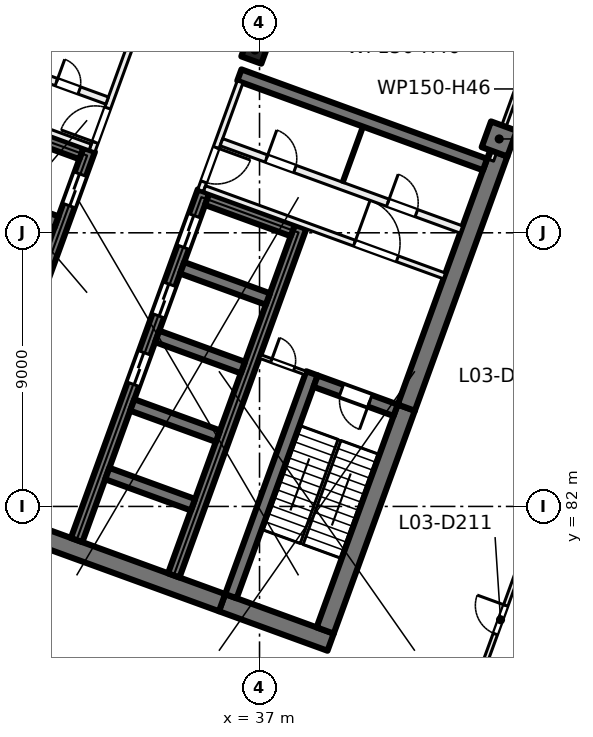
"""IFC4 building model, lengths in metres.
Left out: names, types, materials, properties, quantities, classifications, styles, units other than length and angle.
Written with IfcOpenShell. Run it as: python <this file> out.ifc"""

import sys

from ifc_helpers import new_model, si_unit, direction, frame, frame_2d, origin, origin_2d, place, context, subcontext, project, spatial, rectangle, extrude, element, fill, save


model = new_model("IFC4")
c1 = context("Model", 3, precision=1e-05, world=origin(), true_north=direction((0.0, 1.0)))
c2 = subcontext(c1, "Body", "Model", "MODEL_VIEW")
j1 = project(units=[si_unit("LENGTHUNIT", "METRE"), si_unit("PLANEANGLEUNIT", "RADIAN")], contexts=[c1])
p1 = place(None, origin())
s1 = spatial("IfcSite", under=j1, at=p1, CompositionType="ELEMENT")
p2 = place(p1, origin())
s2 = spatial("IfcBuilding", under=s1, at=p2, CompositionType="ELEMENT")
p3 = place(p2, frame((0.0, 0.0, 17.5)))
s3 = spatial("IfcBuildingStorey", under=s2, at=p3, CompositionType="ELEMENT", Elevation=17.5)
p4 = place(p3, frame((36.849, 97.011, 0.0), z_axis=(0.0, 0.0, 1.0), x_axis=(-0.342020143326, -0.939692620786, 0.0)))
e1 = element("IfcColumn", 1, at=p4, inside=s3, PredefinedType="COLUMN", context=c2, shape_type="SweptSolid", body=[
    extrude(rectangle(XDim=0.7, YDim=0.7, at=origin_2d()), origin(), (0.0, 0.0, 1.0), 5.0),
])
p5 = place(p3, frame((44.884, 94.087, 0.0), z_axis=(0.0, 0.0, 1.0), x_axis=(-0.342020143326, -0.939692620786, 0.0)))
e2 = element("IfcColumn", 2, at=p5, inside=s3, PredefinedType="COLUMN", context=c2, shape_type="SweptSolid", body=[
    extrude(rectangle(XDim=0.9, YDim=0.9, at=origin_2d()), origin(), (0.0, 0.0, 1.0), 5.0),
])
p6 = place(p3, frame((39.338, 77.535, 0.0), z_axis=(0.0, 0.0, 1.0), x_axis=(-0.939701471648, 0.341995824804, 0.0)))
e3 = element("IfcWall", 3, at=p6, inside=s3, PredefinedType="SHEAR", context=c2, shape_type="SweptSolid", body=[
    extrude(rectangle(XDim=3.8, YDim=0.6, at=frame_2d((1.9, 0.0))), origin(), (0.0, 0.0, 1.0), 5.0),
])
p7 = place(p3, frame((35.767, 78.835, 0.0), z_axis=(0.0, 0.0, 1.0), x_axis=(-0.939692894512, 0.342019391267, 0.0)))
e4 = element("IfcWall", 4, at=p7, inside=s3, PredefinedType="SHEAR", context=c2, shape_type="SweptSolid", body=[
    extrude(rectangle(XDim=14.4, YDim=0.6, at=frame_2d((7.2, 0.0))), origin(), (0.0, 0.0, 1.0), 5.0),
])
p8 = place(p3, frame((39.159, 77.92, 0.0), z_axis=(0.0, 0.0, 1.0), x_axis=(0.342016982193, 0.939693771338, 0.0)))
e5 = element("IfcWall", 5, at=p8, inside=s3, PredefinedType="SHEAR", context=c2, shape_type="SweptSolid", body=[
    extrude(rectangle(XDim=7.8, YDim=0.6, at=frame_2d((3.9, 0.0))), origin(), (0.0, 0.0, 1.0), 5.0),
])
p9 = place(p3, frame((41.827, 85.249, 0.0), z_axis=(0.0, 0.0, 1.0), x_axis=(0.342016162452, 0.939694069696, 0.0)))
e6 = element("IfcWall", 6, at=p9, inside=s3, PredefinedType="SHEAR", context=c2, shape_type="SweptSolid", body=[
    extrude(rectangle(XDim=8.9, YDim=0.6, at=frame_2d((4.45, 0.0))), origin(), (0.0, 0.0, 1.0), 5.0),
])
p10 = place(p3, frame((36.058, 79.048, 0.0), z_axis=(0.0, 0.0, 1.0), x_axis=(0.342016982193, 0.939693771338, 0.0)))
e7 = element("IfcWall", 7, at=p10, inside=s3, PredefinedType="SHEAR", context=c2, shape_type="SweptSolid", body=[
    extrude(rectangle(XDim=7.8, YDim=0.4, at=frame_2d((3.9, 0.0))), origin(), (0.0, 0.0, 1.0), 5.0),
])
p11 = place(p3, frame((41.476, 85.164, 0.0), z_axis=(0.0, 0.0, 1.0), x_axis=(-0.939678810556, 0.342058084236, 0.0)))
e8 = element("IfcWall", 8, at=p11, inside=s3, PredefinedType="SHEAR", context=c2, shape_type="SweptSolid", body=[
    extrude(rectangle(XDim=2.8, YDim=0.4, at=frame_2d((1.4, 0.0))), origin(), (0.0, 0.0, 1.0), 5.0),
])
p12 = place(p11, frame((0.9, 0.0, 0.0)))
e9 = element("IfcOpeningElement", 9, at=p12, cuts=e8, PredefinedType="OPENING", context=c2, shape_type="SweptSolid", body=[
    extrude(rectangle(XDim=1.0, YDim=2.1, at=frame_2d((0.5, 1.05))), frame((0.0, 0.21, 0.0), z_axis=(0.0, -1.0, 0.0), x_axis=(1.0, 0.0, 0.0)), (0.0, 0.0, 1.0), 0.42),
])
p13 = place(p3, frame((30.984, 80.895, 0.0), z_axis=(0.0, 0.0, 1.0), x_axis=(0.342021021735, 0.939692301071, 0.0)))
e10 = element("IfcWall", 10, at=p13, inside=s3, PredefinedType="SHEAR", context=c2, shape_type="SweptSolid", body=[
    extrude(rectangle(XDim=12.2, YDim=0.4, at=frame_2d((6.1, 0.0))), origin(), (0.0, 0.0, 1.0), 5.0),
])
p14 = place(p13, frame((5.45, 0.0, 0.0)))
e11 = element("IfcOpeningElement", 11, at=p14, cuts=e10, PredefinedType="OPENING", context=c2, shape_type="SweptSolid", body=[
    extrude(rectangle(XDim=1.1, YDim=2.1, at=frame_2d((0.55, 1.05))), frame((0.0, 0.21, 0.0), z_axis=(0.0, -1.0, 0.0), x_axis=(1.0, 0.0, 0.0)), (0.0, 0.0, 1.0), 0.42),
])
p15 = place(p13, frame((7.85, 0.0, 0.0)))
e12 = element("IfcOpeningElement", 12, at=p15, cuts=e10, PredefinedType="OPENING", context=c2, shape_type="SweptSolid", body=[
    extrude(rectangle(XDim=1.1, YDim=2.1, at=frame_2d((0.55, 1.05))), frame((0.0, 0.21, 0.0), z_axis=(0.0, -1.0, 0.0), x_axis=(1.0, 0.0, 0.0)), (0.0, 0.0, 1.0), 0.42),
])
p16 = place(p13, frame((10.25, 0.0, 0.0)))
e13 = element("IfcOpeningElement", 13, at=p16, cuts=e10, PredefinedType="OPENING", context=c2, shape_type="SweptSolid", body=[
    extrude(rectangle(XDim=1.1, YDim=2.1, at=frame_2d((0.55, 1.05))), frame((0.0, 0.21, 0.0), z_axis=(0.0, -1.0, 0.0), x_axis=(1.0, 0.0, 0.0)), (0.0, 0.0, 1.0), 0.42),
])
p17 = place(p3, frame((34.178, 79.732, 0.0), z_axis=(0.0, 0.0, 1.0), x_axis=(0.342014590177, 0.939694641948, 0.0)))
e14 = element("IfcWall", 14, at=p17, inside=s3, PredefinedType="SHEAR", context=c2, shape_type="SweptSolid", body=[
    extrude(rectangle(XDim=12.2, YDim=0.4, at=frame_2d((6.1, 0.0))), origin(), (0.0, 0.0, 1.0), 5.0),
])
for number, where, z_axis, x_axis in (
    (15, (34.812, 82.056, 0.0), (0.0, 0.0, 1.0), (-0.94, 0.342, 0.0)),
    (16, (35.632, 84.311, 0.0), (0.0, 0.0, 1.0), (-0.94, 0.342, 0.0)),
    (17, (36.453, 86.566, 0.0), (0.0, 0.0, 1.0), (-0.94, 0.342, 0.0)),
    (18, (37.274, 88.822, 0.0), (0.0, 0.0, 1.0), (-0.94, 0.342, 0.0)),
):
    element("IfcWall", number, at=place(p3, frame(where, z_axis=z_axis, x_axis=x_axis)), inside=s3, PredefinedType="SHEAR", context=c2, shape_type="SweptSolid", body=[
        extrude(rectangle(XDim=3.0, YDim=0.4, at=frame_2d((1.5, 0.0))), origin(), (0.0, 0.0, 1.0), 5.0),
    ])
p18 = place(p3, frame((38.095, 91.077, 0.0), z_axis=(0.0, 0.0, 1.0), x_axis=(-0.939676934218, 0.342063238742, 0.0)))
e19 = element("IfcWall", 19, at=p18, inside=s3, PredefinedType="SHEAR", context=c2, shape_type="SweptSolid", body=[
    extrude(rectangle(XDim=3.0, YDim=0.4, at=frame_2d((1.5, 0.0))), origin(), (0.0, 0.0, 1.0), 5.0),
])
p19 = place(p3, frame((27.225, 82.263, 0.0), z_axis=(0.0, 0.0, 1.0), x_axis=(0.342014590177, 0.939694641948, 0.0)))
e20 = element("IfcWall", 20, at=p19, inside=s3, PredefinedType="SHEAR", context=c2, shape_type="SweptSolid", body=[
    extrude(rectangle(XDim=12.2, YDim=0.4, at=frame_2d((6.1, 0.0))), origin(), (0.0, 0.0, 1.0), 5.0),
])
p20 = place(p19, frame((10.25, 0.0, 0.0)))
e21 = element("IfcOpeningElement", 21, at=p20, cuts=e20, PredefinedType="OPENING", context=c2, shape_type="SweptSolid", body=[
    extrude(rectangle(XDim=1.1, YDim=2.1, at=frame_2d((0.55, 1.05))), frame((0.0, 0.21, 0.0), z_axis=(0.0, -1.0, 0.0), x_axis=(1.0, 0.0, 0.0)), (0.0, 0.0, 1.0), 0.42),
])
p21 = place(p19, frame((0.7, 0.0, 0.0)))
e22 = element("IfcOpeningElement", 22, at=p21, cuts=e20, PredefinedType="OPENING", context=c2, shape_type="SweptSolid", body=[
    extrude(rectangle(XDim=0.8, YDim=2.1, at=frame_2d((0.4, 1.05))), frame((0.0, 0.21, 0.0), z_axis=(0.0, -1.0, 0.0), x_axis=(1.0, 0.0, 0.0)), (0.0, 0.0, 1.0), 0.42),
])
for number, where, z_axis, x_axis in (
    (23, (30.32, 91.353, 0.0), (0.0, 0.0, 1.0), (-0.94, 0.342, 0.0)),
    (24, (31.141, 93.608, 0.0), (0.0, 0.0, 1.0), (-0.94, 0.342, 0.0)),
):
    element("IfcWall", number, at=place(p3, frame(where, z_axis=z_axis, x_axis=x_axis)), inside=s3, PredefinedType="SHEAR", context=c2, shape_type="SweptSolid", body=[
        extrude(rectangle(XDim=3.0, YDim=0.4, at=frame_2d((1.5, 0.0))), origin(), (0.0, 0.0, 1.0), 5.0),
    ])
p22 = place(p3, frame((44.418, 93.245, 0.0), z_axis=(0.0, 0.0, 1.0), x_axis=(-0.93969060187, 0.342025690201, 0.0)))
e25 = element("IfcWall", 25, at=p22, inside=s3, PredefinedType="SHEAR", context=c2, shape_type="SweptSolid", body=[
    extrude(rectangle(XDim=8.6, YDim=0.4, at=frame_2d((4.3, 0.0))), origin(), (0.0, 0.0, 1.0), 5.0),
])
p23 = place(p3, frame((31.491, 93.693, 0.0), z_axis=(0.0, 0.0, 1.0), x_axis=(0.341995824804, 0.939701471648, 0.0)))
e26 = element("IfcWall", 26, at=p23, inside=s3, PredefinedType="PARTITIONING", context=c2, shape_type="SweptSolid", body=[
    extrude(rectangle(XDim=3.8, YDim=0.2, at=frame_2d((1.9, 0.0))), origin(), (0.0, 0.0, 1.0), 4.6),
])
p24 = place(p23, frame((0.3, 0.0, 0.0)))
e27 = element("IfcOpeningElement", 27, at=p24, cuts=e26, PredefinedType="OPENING", context=c2, shape_type="SweptSolid", body=[
    extrude(rectangle(XDim=1.2, YDim=2.1, at=frame_2d((0.6, 1.05))), frame((0.0, 0.11, 0.0), z_axis=(0.0, -1.0, 0.0), x_axis=(1.0, 0.0, 0.0)), (0.0, 0.0, 1.0), 0.22),
])
p25 = place(p3, frame((23.538, 96.694, 0.0), z_axis=(0.0, 0.0, 1.0), x_axis=(0.939691552312, -0.342023078919, 0.0)))
e28 = element("IfcWall", 28, at=p25, inside=s3, PredefinedType="PARTITIONING", context=c2, shape_type="SweptSolid", body=[
    extrude(rectangle(XDim=8.4, YDim=0.2, at=frame_2d((4.2, 0.0))), origin(), (0.0, 0.0, 1.0), 4.6),
])
p26 = place(p25, frame((1.65, 0.0, 0.0)))
e29 = element("IfcOpeningElement", 29, at=p26, cuts=e28, PredefinedType="OPENING", context=c2, shape_type="SweptSolid", body=[
    extrude(rectangle(XDim=1.5, YDim=2.1, at=frame_2d((0.75, 1.05))), frame((0.0, 0.11, 0.0), z_axis=(0.0, -1.0, 0.0), x_axis=(1.0, 0.0, 0.0)), (0.0, 0.0, 1.0), 0.22),
])
p27 = place(p3, frame((24.094, 98.221, 0.0), z_axis=(0.0, 0.0, 1.0), x_axis=(0.939691552312, -0.342023078919, 0.0)))
e30 = element("IfcWall", 30, at=p27, inside=s3, PredefinedType="PARTITIONING", context=c2, shape_type="SweptSolid", body=[
    extrude(rectangle(XDim=8.4, YDim=0.25, at=frame_2d((4.2, 0.0))), origin(), (0.0, 0.0, 1.0), 4.6),
])
p28 = place(p27, frame((6.625, 0.0, 0.0)))
e31 = element("IfcOpeningElement", 31, at=p28, cuts=e30, PredefinedType="OPENING", context=c2, shape_type="SweptSolid", body=[
    extrude(rectangle(XDim=0.8, YDim=2.1, at=frame_2d((0.4, 1.05))), frame((0.0, 0.135, 0.0), z_axis=(0.0, -1.0, 0.0), x_axis=(1.0, 0.0, 0.0)), (0.0, 0.0, 1.0), 0.27),
])
p29 = place(p27, frame((2.375, 0.0, 0.0)))
e32 = element("IfcOpeningElement", 32, at=p29, cuts=e30, PredefinedType="OPENING", context=c2, shape_type="SweptSolid", body=[
    extrude(rectangle(XDim=0.8, YDim=2.1, at=frame_2d((0.4, 1.05))), frame((0.0, 0.135, 0.0), z_axis=(0.0, -1.0, 0.0), x_axis=(1.0, 0.0, 0.0)), (0.0, 0.0, 1.0), 0.27),
])
p30 = place(p3, frame((36.362, 95.964, 0.0), z_axis=(0.0, 0.0, 1.0), x_axis=(-0.341995824804, -0.939701471648, 0.0)))
e33 = element("IfcWall", 33, at=p30, inside=s3, PredefinedType="PARTITIONING", context=c2, shape_type="SweptSolid", body=[
    extrude(rectangle(XDim=3.8, YDim=0.2, at=frame_2d((1.9, 0.0))), origin(), (0.0, 0.0, 1.0), 4.6),
])
p31 = place(p30, frame((2.3, 0.0, 0.0)))
e34 = element("IfcOpeningElement", 34, at=p31, cuts=e33, PredefinedType="OPENING", context=c2, shape_type="SweptSolid", body=[
    extrude(rectangle(XDim=1.2, YDim=2.1, at=frame_2d((0.6, 1.05))), frame((0.0, 0.11, 0.0), z_axis=(0.0, -1.0, 0.0), x_axis=(1.0, 0.0, 0.0)), (0.0, 0.0, 1.0), 0.22),
])
p32 = place(p3, frame((35.19, 92.453, 0.0), z_axis=(0.0, 0.0, 1.0), x_axis=(0.939691552312, -0.342023078919, 0.0)))
e35 = element("IfcWall", 35, at=p32, inside=s3, PredefinedType="PARTITIONING", context=c2, shape_type="SweptSolid", body=[
    extrude(rectangle(XDim=8.4, YDim=0.2, at=frame_2d((4.2, 0.0))), origin(), (0.0, 0.0, 1.0), 4.6),
])
p33 = place(p32, frame((5.25, 0.0, 0.0)))
e36 = element("IfcOpeningElement", 36, at=p33, cuts=e35, PredefinedType="OPENING", context=c2, shape_type="SweptSolid", body=[
    extrude(rectangle(XDim=1.5, YDim=2.1, at=frame_2d((0.75, 1.05))), frame((0.0, 0.11, 0.0), z_axis=(0.0, -1.0, 0.0), x_axis=(1.0, 0.0, 0.0)), (0.0, 0.0, 1.0), 0.22),
])
p34 = place(p3, frame((35.746, 93.98, 0.0), z_axis=(0.0, 0.0, 1.0), x_axis=(0.939691552312, -0.342023078919, 0.0)))
e37 = element("IfcWall", 37, at=p34, inside=s3, PredefinedType="PARTITIONING", context=c2, shape_type="SweptSolid", body=[
    extrude(rectangle(XDim=8.4, YDim=0.25, at=frame_2d((4.2, 0.0))), origin(), (0.0, 0.0, 1.0), 4.6),
])
p35 = place(p34, frame((1.575, 0.0, 0.0)))
e38 = element("IfcOpeningElement", 38, at=p35, cuts=e37, PredefinedType="OPENING", context=c2, shape_type="SweptSolid", body=[
    extrude(rectangle(XDim=1.0, YDim=2.1, at=frame_2d((0.5, 1.05))), frame((0.0, 0.135, 0.0), z_axis=(0.0, -1.0, 0.0), x_axis=(1.0, 0.0, 0.0)), (0.0, 0.0, 1.0), 0.27),
])
p36 = place(p34, frame((5.825, 0.0, 0.0)))
e39 = element("IfcOpeningElement", 39, at=p36, cuts=e37, PredefinedType="OPENING", context=c2, shape_type="SweptSolid", body=[
    extrude(rectangle(XDim=1.0, YDim=2.1, at=frame_2d((0.5, 1.05))), frame((0.0, 0.135, 0.0), z_axis=(0.0, -1.0, 0.0), x_axis=(1.0, 0.0, 0.0)), (0.0, 0.0, 1.0), 0.27),
])
p37 = place(p3, frame((37.013, 86.935, 0.0), z_axis=(0.0, 0.0, 1.0), x_axis=(0.939659694648, -0.342110593602, 0.0)))
e40 = element("IfcWall", 40, at=p37, inside=s3, PredefinedType="PARTITIONING", context=c2, shape_type="SweptSolid", body=[
    extrude(rectangle(XDim=1.6, YDim=0.125, at=frame_2d((0.8, 0.0))), origin(), (0.0, 0.0, 1.0), 4.6),
])
p38 = place(p37, frame((0.4, 0.0, 0.0)))
e41 = element("IfcOpeningElement", 41, at=p38, cuts=e40, PredefinedType="OPENING", context=c2, shape_type="SweptSolid", body=[
    extrude(rectangle(XDim=0.8, YDim=2.1, at=frame_2d((0.4, 1.05))), frame((0.0, 0.073, 0.0), z_axis=(0.0, -1.0, 0.0), x_axis=(1.0, 0.0, 0.0)), (0.0, 0.0, 1.0), 0.145),
])
p39 = place(p3, frame((40.403, 94.494, 0.0), z_axis=(0.0, 0.0, 1.0), x_axis=(-0.342064742067, -0.939676386973, 0.0)))
e42 = element("IfcWall", 42, at=p39, inside=s3, PredefinedType="PARTITIONING", context=c2, shape_type="SweptSolid", body=[
    extrude(rectangle(XDim=1.95, YDim=0.1, at=frame_2d((0.975, 0.0))), origin(), (0.0, 0.0, 1.0), 4.6),
])
p40 = place(p3, frame((37.528, 72.554, 0.0), z_axis=(0.0, 0.0, 1.0), x_axis=(-0.939693287343, 0.34201831197, 0.0)))
e43 = element("IfcWall", 43, at=p40, inside=s3, PredefinedType="PARTITIONING", context=c2, shape_type="SweptSolid", body=[
    extrude(rectangle(XDim=22.005, YDim=0.15, at=frame_2d((11.002, 0.0))), origin(), (0.0, 0.0, 1.0), 4.6),
])
p41 = place(p40, frame((16.101, 0.0, 0.0)))
e44 = element("IfcOpeningElement", 44, at=p41, cuts=e43, PredefinedType="OPENING", context=c2, shape_type="SweptSolid", body=[
    extrude(rectangle(XDim=1.0, YDim=2.1, at=frame_2d((0.5, 1.05))), frame((0.0, 0.085, 0.0), z_axis=(0.0, -1.0, 0.0), x_axis=(1.0, 0.0, 0.0)), (0.0, 0.0, 1.0), 0.17),
])
p42 = place(p40, frame((5.105, 0.0, 0.0)))
e45 = element("IfcOpeningElement", 45, at=p42, cuts=e43, PredefinedType="OPENING", context=c2, shape_type="SweptSolid", body=[
    extrude(rectangle(XDim=1.0, YDim=2.1, at=frame_2d((0.5, 1.05))), frame((0.0, 0.085, 0.0), z_axis=(0.0, -1.0, 0.0), x_axis=(1.0, 0.0, 0.0)), (0.0, 0.0, 1.0), 0.17),
])
p43 = place(p3, frame((49.749, 91.52, 0.0), z_axis=(0.0, 0.0, 1.0), x_axis=(-0.342022021776, -0.939691937084, 0.0)))
e46 = element("IfcWall", 46, at=p43, inside=s3, PredefinedType="PARTITIONING", context=c2, shape_type="SweptSolid", body=[
    extrude(rectangle(XDim=17.004, YDim=0.15, at=frame_2d((8.502, 0.0))), origin(), (0.0, 0.0, 1.0), 4.6),
])
p44 = place(p43, frame((13.597, 0.0, 0.0)))
e47 = element("IfcOpeningElement", 47, at=p44, cuts=e46, PredefinedType="OPENING", context=c2, shape_type="SweptSolid", body=[
    extrude(rectangle(XDim=1.0, YDim=2.1, at=frame_2d((0.5, 1.05))), frame((0.0, 0.085, 0.0), z_axis=(0.0, -1.0, 0.0), x_axis=(1.0, 0.0, 0.0)), (0.0, 0.0, 1.0), 0.17),
])
p45 = place(p43, frame((5.101, 0.0, 0.0)))
e48 = element("IfcOpeningElement", 48, at=p45, cuts=e46, PredefinedType="OPENING", context=c2, shape_type="SweptSolid", body=[
    extrude(rectangle(XDim=1.0, YDim=2.1, at=frame_2d((0.5, 1.05))), frame((0.0, 0.085, 0.0), z_axis=(0.0, -1.0, 0.0), x_axis=(1.0, 0.0, 0.0)), (0.0, 0.0, 1.0), 0.17),
])
p46 = place(p3, frame((44.627, 93.382, 0.0), z_axis=(0.0, 0.0, 1.0), x_axis=(0.342025351501, 0.939690725149, 0.0)))
e49 = element("IfcWall", 49, at=p46, inside=s3, PredefinedType="PARTITIONING", context=c2, shape_type="SweptSolid", body=[
    extrude(rectangle(XDim=5.0, YDim=0.15, at=frame_2d((2.5, 0.0))), origin(), (0.0, 0.0, 1.0), 4.6),
])
p47 = place(p20, origin())
e50 = element("IfcDoor", 50, at=p47, inside=s3, OperationType="DOUBLE_DOOR_SLIDING", PredefinedType="DOOR", context=c2, shape_type="SweptSolid", body=[
    extrude(rectangle(XDim=1.1, YDim=2.1, at=frame_2d((0.55, 1.05))), frame((0.0, 0.025, 0.0), z_axis=(0.0, -1.0, 0.0), x_axis=(1.0, 0.0, 0.0)), (0.0, 0.0, 1.0), 0.05),
])
fill(e21, e50)
p48 = place(p14, origin())
e51 = element("IfcDoor", 51, at=p48, inside=s3, OperationType="DOUBLE_DOOR_SLIDING", PredefinedType="DOOR", context=c2, shape_type="SweptSolid", body=[
    extrude(rectangle(XDim=1.1, YDim=2.1, at=frame_2d((0.55, 1.05))), frame((0.0, 0.025, 0.0), z_axis=(0.0, -1.0, 0.0), x_axis=(1.0, 0.0, 0.0)), (0.0, 0.0, 1.0), 0.05),
])
fill(e11, e51)
p49 = place(p15, origin())
e52 = element("IfcDoor", 52, at=p49, inside=s3, OperationType="DOUBLE_DOOR_SLIDING", PredefinedType="DOOR", context=c2, shape_type="SweptSolid", body=[
    extrude(rectangle(XDim=1.1, YDim=2.1, at=frame_2d((0.55, 1.05))), frame((0.0, 0.025, 0.0), z_axis=(0.0, -1.0, 0.0), x_axis=(1.0, 0.0, 0.0)), (0.0, 0.0, 1.0), 0.05),
])
fill(e12, e52)
p50 = place(p16, origin())
e53 = element("IfcDoor", 53, at=p50, inside=s3, OperationType="DOUBLE_DOOR_SLIDING", PredefinedType="DOOR", context=c2, shape_type="SweptSolid", body=[
    extrude(rectangle(XDim=1.1, YDim=2.1, at=frame_2d((0.55, 1.05))), frame((0.0, 0.025, 0.0), z_axis=(0.0, -1.0, 0.0), x_axis=(1.0, 0.0, 0.0)), (0.0, 0.0, 1.0), 0.05),
])
fill(e13, e53)
p51 = place(p24, origin())
e54 = element("IfcDoor", 54, at=p51, inside=s3, OperationType="DOUBLE_DOOR_SINGLE_SWING", PredefinedType="DOOR", context=c2, shape_type="SweptSolid", body=[
    extrude(rectangle(XDim=1.2, YDim=2.1, at=frame_2d((0.6, 1.05))), frame((0.0, 0.025, 0.0), z_axis=(0.0, -1.0, 0.0), x_axis=(1.0, 0.0, 0.0)), (0.0, 0.0, 1.0), 0.05),
])
fill(e27, e54)
p52 = place(p28, origin())
e55 = element("IfcDoor", 55, at=p52, inside=s3, OperationType="SINGLE_SWING_LEFT", PredefinedType="DOOR", context=c2, shape_type="SweptSolid", body=[
    extrude(rectangle(XDim=0.8, YDim=2.1, at=frame_2d((0.4, 1.05))), frame((0.0, 0.025, 0.0), z_axis=(0.0, -1.0, 0.0), x_axis=(1.0, 0.0, 0.0)), (0.0, 0.0, 1.0), 0.05),
])
fill(e31, e55)
p53 = place(p31, origin())
e56 = element("IfcDoor", 56, at=p53, inside=s3, OperationType="DOUBLE_DOOR_SINGLE_SWING", PredefinedType="DOOR", context=c2, shape_type="SweptSolid", body=[
    extrude(rectangle(XDim=1.2, YDim=2.1, at=frame_2d((0.6, 1.05))), frame((0.0, 0.025, 0.0), z_axis=(0.0, -1.0, 0.0), x_axis=(1.0, 0.0, 0.0)), (0.0, 0.0, 1.0), 0.05),
])
fill(e34, e56)
p54 = place(p33, origin())
e57 = element("IfcDoor", 57, at=p54, inside=s3, OperationType="DOUBLE_DOOR_SINGLE_SWING", PredefinedType="DOOR", context=c2, shape_type="SweptSolid", body=[
    extrude(rectangle(XDim=1.5, YDim=2.1, at=frame_2d((0.75, 1.05))), frame((0.0, 0.025, 0.0), z_axis=(0.0, -1.0, 0.0), x_axis=(1.0, 0.0, 0.0)), (0.0, 0.0, 1.0), 0.05),
])
fill(e36, e57)
p55 = place(p12, origin())
e58 = element("IfcDoor", 58, at=p55, inside=s3, OperationType="SINGLE_SWING_RIGHT", PredefinedType="DOOR", context=c2, shape_type="SweptSolid", body=[
    extrude(rectangle(XDim=1.0, YDim=2.1, at=frame_2d((0.5, 1.05))), frame((0.0, 0.025, 0.0), z_axis=(0.0, -1.0, 0.0), x_axis=(1.0, 0.0, 0.0)), (0.0, 0.0, 1.0), 0.05),
])
fill(e9, e58)
p56 = place(p38, origin())
e59 = element("IfcDoor", 59, at=p56, inside=s3, OperationType="SINGLE_SWING_LEFT", PredefinedType="DOOR", context=c2, shape_type="SweptSolid", body=[
    extrude(rectangle(XDim=0.8, YDim=2.1, at=frame_2d((0.4, 1.05))), frame((0.0, 0.025, 0.0), z_axis=(0.0, -1.0, 0.0), x_axis=(1.0, 0.0, 0.0)), (0.0, 0.0, 1.0), 0.05),
])
fill(e41, e59)
p57 = place(p35, origin())
e60 = element("IfcDoor", 60, at=p57, inside=s3, OperationType="SINGLE_SWING_RIGHT", PredefinedType="DOOR", context=c2, shape_type="SweptSolid", body=[
    extrude(rectangle(XDim=1.0, YDim=2.1, at=frame_2d((0.5, 1.05))), frame((0.0, 0.025, 0.0), z_axis=(0.0, -1.0, 0.0), x_axis=(1.0, 0.0, 0.0)), (0.0, 0.0, 1.0), 0.05),
])
fill(e38, e60)
p58 = place(p36, origin())
e61 = element("IfcDoor", 61, at=p58, inside=s3, OperationType="SINGLE_SWING_LEFT", PredefinedType="DOOR", context=c2, shape_type="SweptSolid", body=[
    extrude(rectangle(XDim=1.0, YDim=2.1, at=frame_2d((0.5, 1.05))), frame((0.0, 0.025, 0.0), z_axis=(0.0, -1.0, 0.0), x_axis=(1.0, 0.0, 0.0)), (0.0, 0.0, 1.0), 0.05),
])
fill(e39, e61)
p59 = place(p44, origin())
e62 = element("IfcDoor", 62, at=p59, inside=s3, OperationType="SINGLE_SWING_LEFT", PredefinedType="DOOR", context=c2, shape_type="SweptSolid", body=[
    extrude(rectangle(XDim=1.0, YDim=2.1, at=frame_2d((0.5, 1.05))), frame((0.0, 0.025, 0.0), z_axis=(0.0, -1.0, 0.0), x_axis=(1.0, 0.0, 0.0)), (0.0, 0.0, 1.0), 0.05),
])
fill(e47, e62)
save(model, sys.argv[1])
